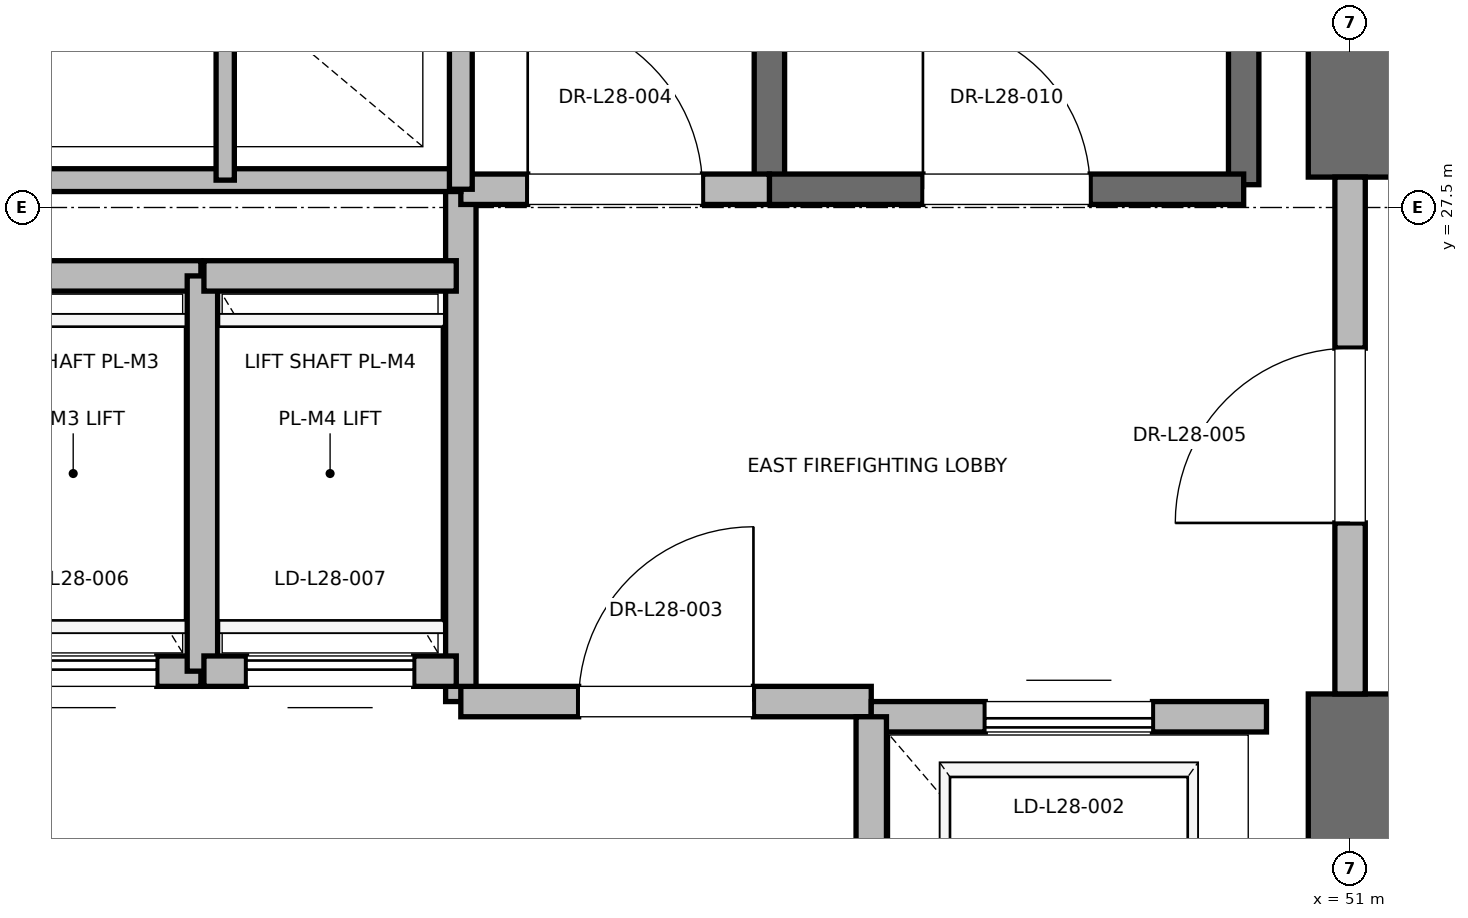
"""IFC4 building model, lengths in metres.
Left out: names, types, materials, properties, quantities, classifications, styles, units other than length and angle.
Written with IfcOpenShell. Run it as: python <this file> out.ifc"""

import sys

from ifc_helpers import new_model, si_unit, direction, frame, frame_2d, origin, place, context, subcontext, project, spatial, rectangle, extrude, element, fill, save


model = new_model("IFC4")
c1 = context("Model", 3, precision=1e-05, world=origin(), true_north=direction((0.0, 1.0)))
c2 = subcontext(c1, "Body", "Model", "MODEL_VIEW")
j1 = project(units=[si_unit("LENGTHUNIT", "METRE"), si_unit("PLANEANGLEUNIT", "RADIAN")], contexts=[c1])
p1 = place(None, origin())
s1 = spatial("IfcSite", under=j1, at=p1, CompositionType="ELEMENT")
p2 = place(p1, origin())
s2 = spatial("IfcBuilding", under=s1, at=p2, CompositionType="ELEMENT")
p3 = place(p2, frame((0.0, 0.0, 123.4)))
s3 = spatial("IfcBuildingStorey", under=s2, at=p3, CompositionType="ELEMENT", Elevation=123.4)
p4 = place(p3, frame((51.0, 18.5, 0.0), z_axis=(0.0, 0.0, 1.0), x_axis=(0.0, 1.0, 0.0)))
e1 = element("IfcWall", 1, at=p4, inside=s3, PredefinedType="SHEAR", context=c2, shape_type="SweptSolid", body=[
    extrude(rectangle(XDim=5.8, YDim=0.55, at=frame_2d((2.9, 0.0))), origin(), (0.0, 0.0, 1.0), 4.775),
])
p5 = place(p3, frame((51.0, 27.7, 0.0), z_axis=(0.0, 0.0, 1.0), x_axis=(0.0, 1.0, 0.0)))
e2 = element("IfcWall", 2, at=p5, inside=s3, PredefinedType="SHEAR", context=c2, shape_type="SweptSolid", body=[
    extrude(rectangle(XDim=8.8, YDim=0.55, at=frame_2d((4.4, 0.0))), origin(), (0.0, 0.0, 1.0), 4.775),
])
p6 = place(p3, frame((50.3, 27.65, 0.0), z_axis=(0.0, 0.0, 1.0), x_axis=(0.0, 1.0, 0.0)))
e3 = element("IfcWall", 3, at=p6, inside=s3, PredefinedType="SOLIDWALL", context=c2, shape_type="SweptSolid", body=[
    extrude(rectangle(XDim=8.15, YDim=0.2, at=frame_2d((4.075, 0.0))), origin(), (0.0, 0.0, 1.0), 4.775),
])
p7 = place(p3, frame((47.18, 27.62, 0.0), z_axis=(0.0, 0.0, 1.0), x_axis=(0.0, 1.0, 0.0)))
e4 = element("IfcWall", 4, at=p7, inside=s3, PredefinedType="SOLIDWALL", context=c2, shape_type="SweptSolid", body=[
    extrude(rectangle(XDim=8.18, YDim=0.2, at=frame_2d((4.09, 0.0))), origin(), (0.0, 0.0, 1.0), 4.775),
])
p8 = place(p3, frame((47.18, 27.62, 0.0), z_axis=(0.0, 0.0, 1.0), x_axis=(1.0, 0.0, 0.0)))
e5 = element("IfcWall", 5, at=p8, inside=s3, PredefinedType="SOLIDWALL", context=c2, shape_type="SweptSolid", body=[
    extrude(rectangle(XDim=3.12, YDim=0.2, at=frame_2d((1.56, 0.0))), origin(), (0.0, 0.0, 1.0), 4.775),
])
p9 = place(p8, frame((1.01, 0.0, 0.0)))
e6 = element("IfcOpeningElement", 6, at=p9, cuts=e5, PredefinedType="OPENING", context=c2, shape_type="SweptSolid", body=[
    extrude(rectangle(XDim=1.1, YDim=2.15, at=frame_2d((0.55, 1.075))), frame((0.0, 0.1, 0.0), z_axis=(0.0, -1.0, 0.0), x_axis=(1.0, 0.0, 0.0)), (0.0, 0.0, 1.0), 0.2),
])
p10 = place(p3, frame((45.15, 24.25, 0.0), z_axis=(0.0, 0.0, 1.0), x_axis=(0.0, 1.0, 0.0)))
e7 = element("IfcWall", 7, at=p10, inside=s3, PredefinedType="PARTITIONING", context=c2, shape_type="SweptSolid", body=[
    extrude(rectangle(XDim=3.37, YDim=0.2, at=frame_2d((1.685, 0.0))), origin(), (0.0, 0.0, 1.0), 4.775),
])
p11 = place(p3, frame((45.15, 24.25, 0.0), z_axis=(0.0, 0.0, 1.0), x_axis=(1.0, 0.0, 0.0)))
e8 = element("IfcWall", 8, at=p11, inside=s3, PredefinedType="PARTITIONING", context=c2, shape_type="SweptSolid", body=[
    extrude(rectangle(XDim=2.7, YDim=0.2, at=frame_2d((1.35, 0.0))), origin(), (0.0, 0.0, 1.0), 4.775),
])
p12 = place(p11, frame((0.775, 0.0, 0.0)))
e9 = element("IfcOpeningElement", 9, at=p12, cuts=e8, PredefinedType="OPENING", context=c2, shape_type="SweptSolid", body=[
    extrude(rectangle(XDim=1.15, YDim=2.2, at=frame_2d((0.575, 1.1))), frame((0.0, 0.1, 0.0), z_axis=(0.0, -1.0, 0.0), x_axis=(1.0, 0.0, 0.0)), (0.0, 0.0, 1.0), 0.2),
])
p13 = place(p3, frame((45.15, 27.62, 0.0), z_axis=(0.0, 0.0, 1.0), x_axis=(1.0, 0.0, 0.0)))
e10 = element("IfcWall", 10, at=p13, inside=s3, PredefinedType="PARTITIONING", context=c2, shape_type="SweptSolid", body=[
    extrude(rectangle(XDim=2.03, YDim=0.2, at=frame_2d((1.015, 0.0))), origin(), (0.0, 0.0, 1.0), 4.775),
])
p14 = place(p13, frame((0.44, 0.0, 0.0)))
e11 = element("IfcOpeningElement", 11, at=p14, cuts=e10, PredefinedType="OPENING", context=c2, shape_type="SweptSolid", body=[
    extrude(rectangle(XDim=1.15, YDim=2.2, at=frame_2d((0.575, 1.1))), frame((0.0, 0.1, 0.0), z_axis=(0.0, -1.0, 0.0), x_axis=(1.0, 0.0, 0.0)), (0.0, 0.0, 1.0), 0.2),
])
p15 = place(p3, frame((51.0, 24.3, 0.0), z_axis=(0.0, 0.0, 1.0), x_axis=(0.0, 1.0, 0.0)))
e12 = element("IfcWall", 12, at=p15, inside=s3, PredefinedType="PARTITIONING", context=c2, shape_type="SweptSolid", body=[
    extrude(rectangle(XDim=3.4, YDim=0.2, at=frame_2d((1.7, 0.0))), origin(), (0.0, 0.0, 1.0), 3.755),
])
p16 = place(p15, frame((1.125, 0.0, 0.0)))
e13 = element("IfcOpeningElement", 13, at=p16, cuts=e12, PredefinedType="OPENING", context=c2, shape_type="SweptSolid", body=[
    extrude(rectangle(XDim=1.15, YDim=2.2, at=frame_2d((0.575, 1.1))), frame((0.0, 0.1, 0.0), z_axis=(0.0, -1.0, 0.0), x_axis=(1.0, 0.0, 0.0)), (0.0, 0.0, 1.0), 0.2),
])
p17 = place(p3, frame((50.45, 24.15, 0.0), z_axis=(0.0, 0.0, 1.0), x_axis=(-1.0, 0.0, 0.0)))
e14 = element("IfcWall", 14, at=p17, inside=s3, PredefinedType="SOLIDWALL", context=c2, shape_type="SweptSolid", body=[
    extrude(rectangle(XDim=2.6, YDim=0.2, at=frame_2d((1.3, 0.0))), origin(), (0.0, 0.0, 1.0), 3.755),
])
p18 = place(p17, frame((0.75, 0.0, 0.0)))
e15 = element("IfcOpeningElement", 15, at=p18, cuts=e14, PredefinedType="OPENING", context=c2, shape_type="SweptSolid", body=[
    extrude(rectangle(XDim=1.1, YDim=2.2, at=frame_2d((0.55, 1.1))), frame((0.0, 0.1, 0.0), z_axis=(0.0, -1.0, 0.0), x_axis=(1.0, 0.0, 0.0)), (0.0, 0.0, 1.0), 0.2),
])
p19 = place(p3, frame((47.85, 24.15, 0.0), z_axis=(0.0, 0.0, 1.0), x_axis=(0.0, -1.0, 0.0)))
e16 = element("IfcWall", 16, at=p19, inside=s3, PredefinedType="SOLIDWALL", context=c2, shape_type="SweptSolid", body=[
    extrude(rectangle(XDim=3.0, YDim=0.2, at=frame_2d((1.5, 0.0))), origin(), (0.0, 0.0, 1.0), 4.775),
])
p20 = place(p3, frame((41.76, 24.45, 0.0), z_axis=(0.0, 0.0, 1.0), x_axis=(1.0, 0.0, 0.0)))
e17 = element("IfcWall", 17, at=p20, inside=s3, PredefinedType="SOLIDWALL", context=c2, shape_type="SweptSolid", body=[
    extrude(rectangle(XDim=1.68, YDim=0.2, at=frame_2d((0.84, 0.0))), origin(), (0.0, 0.0, 1.0), 4.775),
])
p21 = place(p20, frame((0.29, 0.0, 0.0)))
e18 = element("IfcOpeningElement", 18, at=p21, cuts=e17, PredefinedType="OPENING", context=c2, shape_type="SweptSolid", body=[
    extrude(rectangle(XDim=1.1, YDim=2.2, at=frame_2d((0.55, 1.1))), frame((0.0, 0.1, 0.0), z_axis=(0.0, -1.0, 0.0), x_axis=(1.0, 0.0, 0.0)), (0.0, 0.0, 1.0), 0.2),
])
p22 = place(p3, frame((43.44, 27.05, 0.0), z_axis=(0.0, 0.0, 1.0), x_axis=(-1.0, 0.0, 0.0)))
e19 = element("IfcWall", 19, at=p22, inside=s3, PredefinedType="SOLIDWALL", context=c2, shape_type="SweptSolid", body=[
    extrude(rectangle(XDim=1.68, YDim=0.2, at=frame_2d((0.84, 0.0))), origin(), (0.0, 0.0, 1.0), 4.775),
])
p23 = place(p3, frame((43.45, 24.45, 0.0), z_axis=(0.0, 0.0, 1.0), x_axis=(0.0, 1.0, 0.0)))
e20 = element("IfcWall", 20, at=p23, inside=s3, PredefinedType="SOLIDWALL", context=c2, shape_type="SweptSolid", body=[
    extrude(rectangle(XDim=2.6, YDim=0.2, at=frame_2d((1.3, 0.0))), origin(), (0.0, 0.0, 1.0), 4.775),
])
p24 = place(p3, frame((43.46, 24.45, 0.0), z_axis=(0.0, 0.0, 1.0), x_axis=(1.0, 0.0, 0.0)))
e21 = element("IfcWall", 21, at=p24, inside=s3, PredefinedType="SOLIDWALL", context=c2, shape_type="SweptSolid", body=[
    extrude(rectangle(XDim=1.66, YDim=0.2, at=frame_2d((0.83, 0.0))), origin(), (0.0, 0.0, 1.0), 4.775),
])
p25 = place(p24, frame((0.28, 0.0, 0.0)))
e22 = element("IfcOpeningElement", 22, at=p25, cuts=e21, PredefinedType="OPENING", context=c2, shape_type="SweptSolid", body=[
    extrude(rectangle(XDim=1.1, YDim=2.2, at=frame_2d((0.55, 1.1))), frame((0.0, 0.1, 0.0), z_axis=(0.0, -1.0, 0.0), x_axis=(1.0, 0.0, 0.0)), (0.0, 0.0, 1.0), 0.2),
])
p26 = place(p3, frame((45.12, 27.05, 0.0), z_axis=(0.0, 0.0, 1.0), x_axis=(-1.0, 0.0, 0.0)))
e23 = element("IfcWall", 23, at=p26, inside=s3, PredefinedType="SOLIDWALL", context=c2, shape_type="SweptSolid", body=[
    extrude(rectangle(XDim=1.66, YDim=0.2, at=frame_2d((0.83, 0.0))), origin(), (0.0, 0.0, 1.0), 4.775),
])
p27 = place(p3, frame((41.56, 27.68, 0.0), z_axis=(0.0, 0.0, 1.0), x_axis=(1.0, 0.0, 0.0)))
e24 = element("IfcWall", 24, at=p27, inside=s3, PredefinedType="PARTITIONING", context=c2, shape_type="SweptSolid", body=[
    extrude(rectangle(XDim=3.59, YDim=0.15, at=frame_2d((1.795, 0.0))), origin(), (0.0, 0.0, 1.0), 2.85),
])
p28 = place(p3, frame((45.15, 27.62, 0.0), z_axis=(0.0, 0.0, 1.0), x_axis=(0.0, 1.0, 0.0)))
e25 = element("IfcWall", 25, at=p28, inside=s3, PredefinedType="PARTITIONING", context=c2, shape_type="SweptSolid", body=[
    extrude(rectangle(XDim=3.1, YDim=0.15, at=frame_2d((1.55, 0.0))), origin(), (0.0, 0.0, 1.0), 2.85),
])
p29 = place(p3, frame((43.6, 27.68, 0.0), z_axis=(0.0, 0.0, 1.0), x_axis=(0.0, 1.0, 0.0)))
e26 = element("IfcWall", 26, at=p29, inside=s3, PredefinedType="PARTITIONING", context=c2, shape_type="SweptSolid", body=[
    extrude(rectangle(XDim=3.04, YDim=0.12, at=frame_2d((1.52, 0.0))), origin(), (0.0, 0.0, 1.0), 2.85),
])
p30 = place(p9, origin())
e27 = element("IfcDoor", 27, at=p30, inside=s3, OperationType="SINGLE_SWING_LEFT", PredefinedType="DOOR", context=c2, shape_type="SweptSolid", body=[
    extrude(rectangle(XDim=1.1, YDim=2.15, at=frame_2d((0.55, 1.075))), frame((0.0, 0.025, 0.0), z_axis=(0.0, -1.0, 0.0), x_axis=(1.0, 0.0, 0.0)), (0.0, 0.0, 1.0), 0.05),
])
fill(e6, e27)
p31 = place(p12, origin())
e28 = element("IfcDoor", 28, at=p31, inside=s3, OperationType="SINGLE_SWING_RIGHT", PredefinedType="DOOR", context=c2, shape_type="SweptSolid", body=[
    extrude(rectangle(XDim=1.15, YDim=2.2, at=frame_2d((0.575, 1.1))), frame((0.0, 0.025, 0.0), z_axis=(0.0, -1.0, 0.0), x_axis=(1.0, 0.0, 0.0)), (0.0, 0.0, 1.0), 0.05),
])
fill(e9, e28)
p32 = place(p14, origin())
e29 = element("IfcDoor", 29, at=p32, inside=s3, OperationType="SINGLE_SWING_LEFT", PredefinedType="DOOR", context=c2, shape_type="SweptSolid", body=[
    extrude(rectangle(XDim=1.15, YDim=2.2, at=frame_2d((0.575, 1.1))), frame((0.0, 0.025, 0.0), z_axis=(0.0, -1.0, 0.0), x_axis=(1.0, 0.0, 0.0)), (0.0, 0.0, 1.0), 0.05),
])
fill(e11, e29)
p33 = place(p16, origin())
e30 = element("IfcDoor", 30, at=p33, inside=s3, OperationType="SINGLE_SWING_LEFT", PredefinedType="DOOR", context=c2, shape_type="SweptSolid", body=[
    extrude(rectangle(XDim=1.15, YDim=2.2, at=frame_2d((0.575, 1.1))), frame((0.0, 0.025, 0.0), z_axis=(0.0, -1.0, 0.0), x_axis=(1.0, 0.0, 0.0)), (0.0, 0.0, 1.0), 0.05),
])
fill(e13, e30)
p34 = place(p18, origin())
e31 = element("IfcDoor", 31, at=p34, inside=s3, OperationType="SLIDING_TO_RIGHT", PredefinedType="DOOR", context=c2, shape_type="SweptSolid", body=[
    extrude(rectangle(XDim=1.1, YDim=2.2, at=frame_2d((0.55, 1.1))), frame((0.0, 0.025, 0.0), z_axis=(0.0, -1.0, 0.0), x_axis=(1.0, 0.0, 0.0)), (0.0, 0.0, 1.0), 0.05),
])
fill(e15, e31)
p35 = place(p21, origin())
e32 = element("IfcDoor", 32, at=p35, inside=s3, OperationType="SLIDING_TO_RIGHT", PredefinedType="DOOR", context=c2, shape_type="SweptSolid", body=[
    extrude(rectangle(XDim=1.1, YDim=2.2, at=frame_2d((0.55, 1.1))), frame((0.0, 0.025, 0.0), z_axis=(0.0, -1.0, 0.0), x_axis=(1.0, 0.0, 0.0)), (0.0, 0.0, 1.0), 0.05),
])
fill(e18, e32)
p36 = place(p25, origin())
e33 = element("IfcDoor", 33, at=p36, inside=s3, OperationType="SLIDING_TO_RIGHT", PredefinedType="DOOR", context=c2, shape_type="SweptSolid", body=[
    extrude(rectangle(XDim=1.1, YDim=2.2, at=frame_2d((0.55, 1.1))), frame((0.0, 0.025, 0.0), z_axis=(0.0, -1.0, 0.0), x_axis=(1.0, 0.0, 0.0)), (0.0, 0.0, 1.0), 0.05),
])
fill(e22, e33)
save(model, sys.argv[1])
